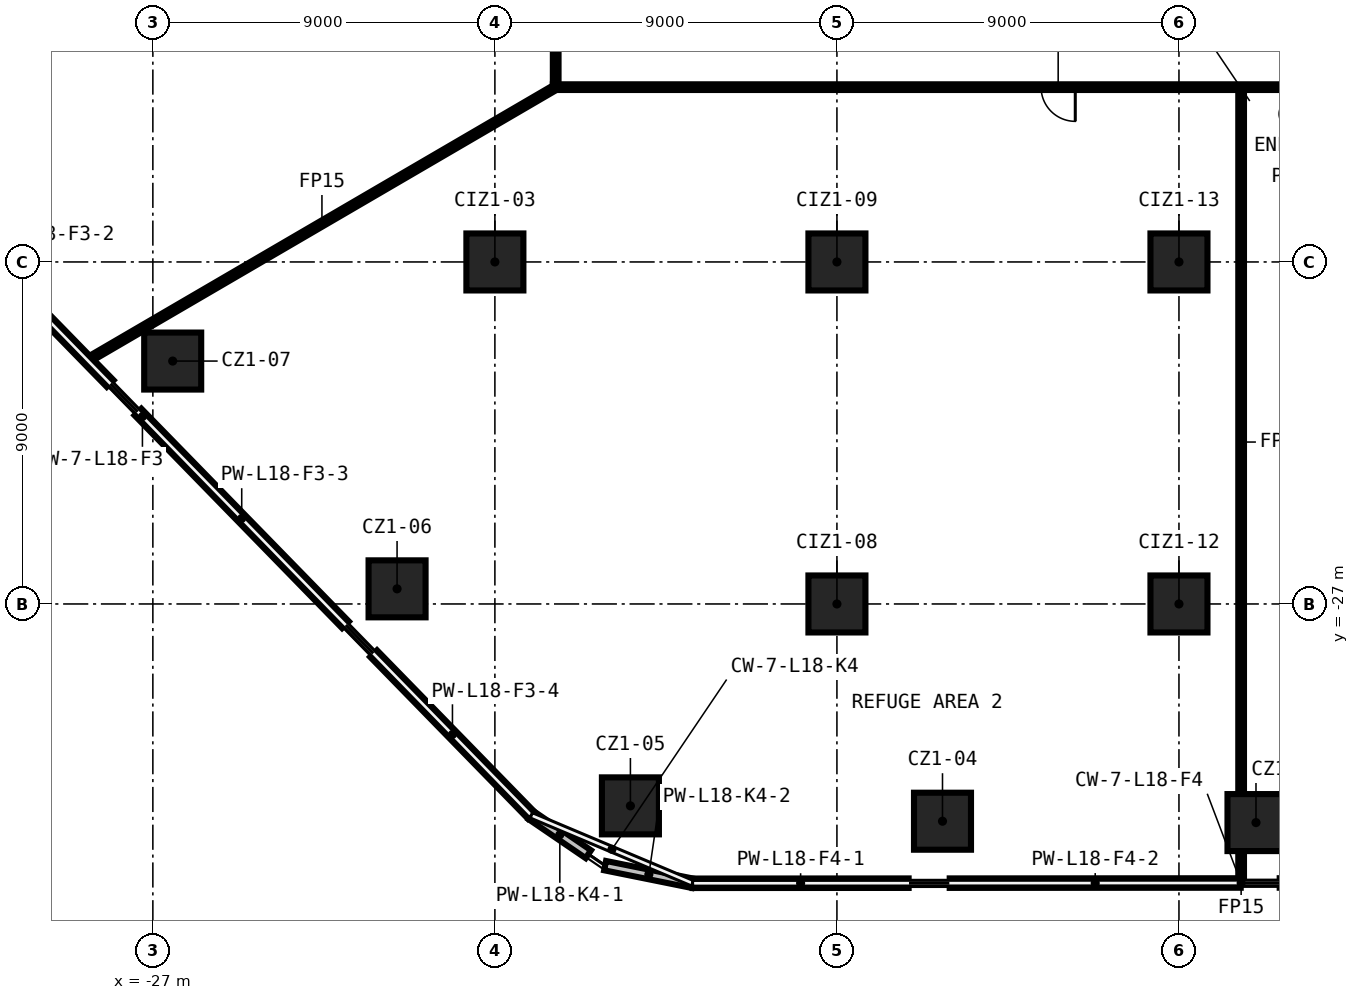
"""IFC4 building model, lengths in metres.
Left out: names, types, materials, properties, quantities, classifications, styles, units other than length and angle.
Written with IfcOpenShell. Run it as: python <this file> out.ifc"""

import sys

from ifc_helpers import new_model, si_unit, direction, frame, frame_2d, origin, origin_2d, place, context, subcontext, project, spatial, rectangle, extrude, element, fill, save


model = new_model("IFC4")
c1 = context("Model", 3, precision=1e-05, world=origin(), true_north=direction((0.0, 1.0)))
c2 = subcontext(c1, "Body", "Model", "MODEL_VIEW")
j1 = project(units=[si_unit("LENGTHUNIT", "METRE"), si_unit("PLANEANGLEUNIT", "RADIAN")], contexts=[c1])
p1 = place(None, origin())
s1 = spatial("IfcSite", under=j1, at=p1, CompositionType="ELEMENT")
p2 = place(p1, origin())
s2 = spatial("IfcBuilding", under=s1, at=p2, CompositionType="ELEMENT")
p3 = place(p2, frame((0.0, 0.0, 89.2)))
s3 = spatial("IfcBuildingStorey", under=s2, at=p3, CompositionType="ELEMENT", Elevation=89.2)
for number, where, z_axis, x_axis in (
    (1, (2.027, -32.753, 0.0), (0.0, 0.0, 1.0), (1.0, 0.0, 0.0)),
    (2, (-6.222, -32.717, 0.0), (0.0, 0.0, 1.0), (1.0, 0.0, 0.0)),
    (3, (-14.434, -32.313, 0.0), (0.0, 0.0, 1.0), (1.0, 0.0, 0.0)),
    (4, (-20.574, -26.602, 0.0), (0.0, 0.0, 1.0), (1.0, 0.0, 0.0)),
    (5, (-26.478, -20.608, 0.0), (0.0, 0.0, 1.0), (1.0, 0.0, 0.0)),
    (6, (-18.0, -18.0, 0.0), (0.0, 0.0, 1.0), (1.0, 0.0, 0.0)),
    (7, (-9.0, -27.0, 0.0), (0.0, 0.0, 1.0), (1.0, 0.0, 0.0)),
    (8, (-9.0, -18.0, 0.0), (0.0, 0.0, 1.0), (1.0, 0.0, 0.0)),
    (9, (0.0, -27.0, 0.0), (0.0, 0.0, 1.0), (1.0, 0.0, 0.0)),
    (10, (0.0, -18.0, 0.0), (0.0, 0.0, 1.0), (1.0, 0.0, 0.0)),
):
    element("IfcColumn", number, at=place(p3, frame(where, z_axis=z_axis, x_axis=x_axis)), inside=s3, PredefinedType="COLUMN", context=c2, shape_type="SweptSolid", body=[
        extrude(rectangle(XDim=1.5, YDim=1.5, at=origin_2d()), origin(), (0.0, 0.0, 1.0), 5.55),
    ])
p4 = place(p3, frame((16.475, -13.4, 0.0), z_axis=(0.0, 0.0, 1.0), x_axis=(-1.0, 0.0, 0.0)))
e11 = element("IfcWall", 11, at=p4, inside=s3, PredefinedType="PARTITIONING", context=c2, shape_type="SweptSolid", body=[
    extrude(rectangle(XDim=32.95, YDim=0.15, at=frame_2d((16.475, 0.0))), origin(), (0.0, 0.0, 1.0), 5.55),
])
p5 = place(p4, frame((19.203, 0.0, 0.0)))
e12 = element("IfcOpeningElement", 12, at=p5, cuts=e11, PredefinedType="OPENING", context=c2, shape_type="SweptSolid", body=[
    extrude(rectangle(XDim=0.9, YDim=2.1, at=frame_2d((0.45, 1.05))), frame((0.0, 0.085, 0.0), z_axis=(0.0, -1.0, 0.0), x_axis=(1.0, 0.0, 0.0)), (0.0, 0.0, 1.0), 0.17),
])
p6 = place(p4, frame((2.192, 0.0, 0.0)))
e13 = element("IfcOpeningElement", 13, at=p6, cuts=e11, PredefinedType="OPENING", context=c2, shape_type="SweptSolid", body=[
    extrude(rectangle(XDim=0.9, YDim=2.1, at=frame_2d((0.45, 1.05))), frame((0.0, 0.085, 0.0), z_axis=(0.0, -1.0, 0.0), x_axis=(1.0, 0.0, 0.0)), (0.0, 0.0, 1.0), 0.17),
])
p7 = place(p3, frame((-28.702, -20.577, 0.0), z_axis=(0.0, 0.0, 1.0), x_axis=(0.863745948182, 0.503927511652, 0.0)))
e14 = element("IfcWall", 14, at=p7, inside=s3, PredefinedType="PARTITIONING", context=c2, shape_type="SweptSolid", body=[
    extrude(rectangle(XDim=14.243, YDim=0.15, at=frame_2d((7.121, 0.0))), origin(), (0.0, 0.0, 1.0), 5.55),
])
p8 = place(p3, frame((1.636, -34.323, 0.0), z_axis=(0.0, 0.0, 1.0), x_axis=(0.0, 1.0, 0.0)))
e15 = element("IfcWall", 15, at=p8, inside=s3, PredefinedType="PARTITIONING", context=c2, shape_type="SweptSolid", body=[
    extrude(rectangle(XDim=0.82, YDim=0.15, at=frame_2d((0.41, 0.0))), origin(), (0.0, 0.0, 1.0), 5.55),
])
p9 = place(p3, frame((1.636, -32.003, 0.0), z_axis=(0.0, 0.0, 1.0), x_axis=(0.0, 1.0, 0.0)))
e16 = element("IfcWall", 16, at=p9, inside=s3, PredefinedType="PARTITIONING", context=c2, shape_type="SweptSolid", body=[
    extrude(rectangle(XDim=18.528, YDim=0.15, at=frame_2d((9.264, 0.0))), origin(), (0.0, 0.0, 1.0), 5.55),
])
p10 = place(p3, frame((-16.4, -13.325, 0.0), z_axis=(0.0, 0.0, 1.0), x_axis=(0.0, 1.0, 0.0)))
e17 = element("IfcWall", 17, at=p10, inside=s3, PredefinedType="PARTITIONING", context=c2, shape_type="SweptSolid", body=[
    extrude(rectangle(XDim=26.65, YDim=0.15, at=frame_2d((13.325, 0.0))), origin(), (0.0, 0.0, 1.0), 5.55),
])
p11 = place(p10, frame((1.621, 0.0, 0.0)))
e18 = element("IfcOpeningElement", 18, at=p11, cuts=e17, PredefinedType="OPENING", context=c2, shape_type="SweptSolid", body=[
    extrude(rectangle(XDim=0.9, YDim=2.1, at=frame_2d((0.45, 1.05))), frame((0.0, 0.085, 0.0), z_axis=(0.0, -1.0, 0.0), x_axis=(1.0, 0.0, 0.0)), (0.0, 0.0, 1.0), 0.17),
])
p12 = place(p10, frame((24.098, 0.0, 0.0)))
e19 = element("IfcOpeningElement", 19, at=p12, cuts=e17, PredefinedType="OPENING", context=c2, shape_type="SweptSolid", body=[
    extrude(rectangle(XDim=0.9, YDim=2.1, at=frame_2d((0.45, 1.05))), frame((0.0, 0.085, 0.0), z_axis=(0.0, -1.0, 0.0), x_axis=(1.0, 0.0, 0.0)), (0.0, 0.0, 1.0), 0.17),
])
p13 = place(p10, frame((19.088, 0.0, 0.0)))
e20 = element("IfcOpeningElement", 20, at=p13, cuts=e17, PredefinedType="OPENING", context=c2, shape_type="SweptSolid", body=[
    extrude(rectangle(XDim=0.9, YDim=2.1, at=frame_2d((0.45, 1.05))), frame((0.0, 0.085, 0.0), z_axis=(0.0, -1.0, 0.0), x_axis=(1.0, 0.0, 0.0)), (0.0, 0.0, 1.0), 0.17),
])
p14 = place(p3, frame((-33.536, -15.649, 0.0), z_axis=(0.0, 0.0, 1.0), x_axis=(0.698186501695, -0.715915923032, 0.0)))
e21 = element("IfcWall", 21, at=p14, inside=s3, PredefinedType="SOLIDWALL", context=c2, shape_type="SweptSolid", body=[
    extrude(rectangle(XDim=7.753, YDim=0.25, at=frame_2d((3.876, 0.0))), origin(), (0.0, 0.0, 1.0), 5.55),
])
p15 = place(p3, frame((-27.392, -21.949, 0.0), z_axis=(0.0, 0.0, 1.0), x_axis=(0.698185352387, -0.715917043876, 0.0)))
e22 = element("IfcWall", 22, at=p15, inside=s3, PredefinedType="SOLIDWALL", context=c2, shape_type="SweptSolid", body=[
    extrude(rectangle(XDim=7.821, YDim=0.25, at=frame_2d((3.91, 0.0))), origin(), (0.0, 0.0, 1.0), 5.55),
])
p16 = place(p3, frame((-21.192, -28.307, 0.0), z_axis=(0.0, 0.0, 1.0), x_axis=(0.698180138844, -0.715922128254, 0.0)))
e23 = element("IfcWall", 23, at=p16, inside=s3, PredefinedType="SOLIDWALL", context=c2, shape_type="SweptSolid", body=[
    extrude(rectangle(XDim=5.945, YDim=0.25, at=frame_2d((2.972, 0.0))), origin(), (0.0, 0.0, 1.0), 5.55),
])
p17 = place(p3, frame((-17.042, -32.562, 0.0), z_axis=(0.0, 0.0, 1.0), x_axis=(0.82627570096, -0.56326589281, 0.0)))
e24 = element("IfcWall", 24, at=p17, inside=s3, PredefinedType="SOLIDWALL", context=c2, shape_type="SweptSolid", body=[
    extrude(rectangle(XDim=1.816, YDim=0.25, at=frame_2d((0.908, 0.0))), origin(), (0.0, 0.0, 1.0), 5.55),
])
p18 = place(p3, frame((-15.1, -33.886, 0.0), z_axis=(0.0, 0.0, 1.0), x_axis=(0.980247502871, -0.197774702922, 0.0)))
e25 = element("IfcWall", 25, at=p18, inside=s3, PredefinedType="SOLIDWALL", context=c2, shape_type="SweptSolid", body=[
    extrude(rectangle(XDim=2.349, YDim=0.25, at=frame_2d((1.175, 0.0))), origin(), (0.0, 0.0, 1.0), 5.55),
])
p19 = place(p3, frame((-12.798, -34.35, 0.0), z_axis=(0.0, 0.0, 1.0), x_axis=(0.999999867183, 0.000515397432, 0.0)))
e26 = element("IfcWall", 26, at=p19, inside=s3, PredefinedType="SOLIDWALL", context=c2, shape_type="SweptSolid", body=[
    extrude(rectangle(XDim=5.684, YDim=0.25, at=frame_2d((2.842, 0.0))), origin(), (0.0, 0.0, 1.0), 5.55),
])
p20 = place(p3, frame((-6.032, -34.347, 0.0), z_axis=(0.0, 0.0, 1.0), x_axis=(0.999999869879, 0.000510138947, 0.0)))
e27 = element("IfcWall", 27, at=p20, inside=s3, PredefinedType="SOLIDWALL", context=c2, shape_type="SweptSolid", body=[
    extrude(rectangle(XDim=7.657, YDim=0.25, at=frame_2d((3.829, 0.0))), origin(), (0.0, 0.0, 1.0), 5.55),
])
p21 = place(p5, origin())
e28 = element("IfcDoor", 28, at=p21, inside=s3, OperationType="SINGLE_SWING_LEFT", PredefinedType="DOOR", context=c2, shape_type="SweptSolid", body=[
    extrude(rectangle(XDim=0.9, YDim=2.1, at=frame_2d((0.45, 1.05))), frame((0.0, 0.025, 0.0), z_axis=(0.0, -1.0, 0.0), x_axis=(1.0, 0.0, 0.0)), (0.0, 0.0, 1.0), 0.05),
])
fill(e12, e28)
save(model, sys.argv[1])
